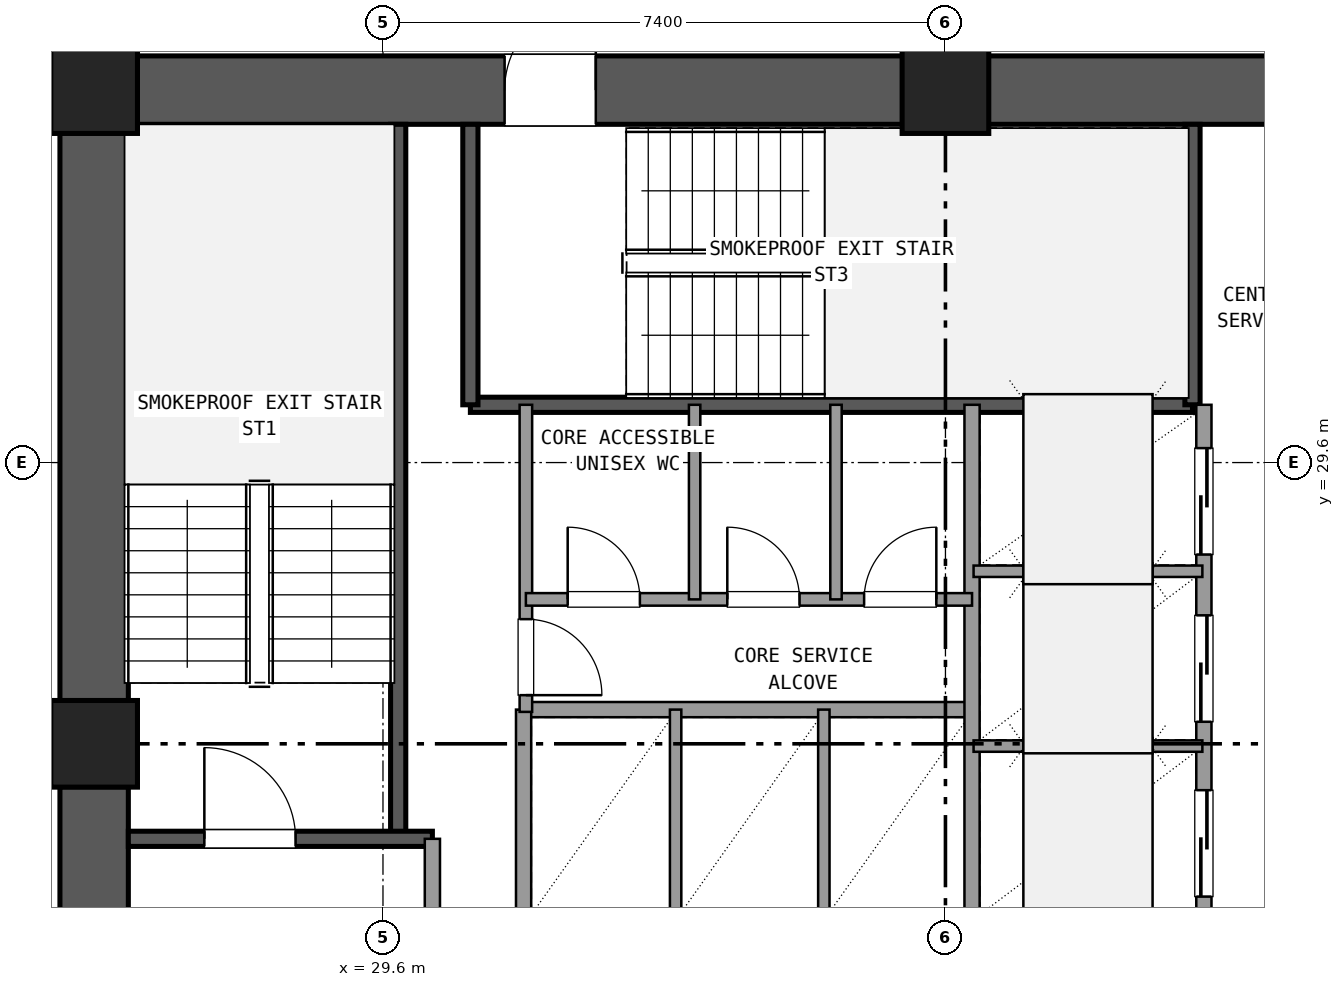
"""IFC4 building model, lengths in metres.
Left out: names, types, materials, properties, quantities, classifications, styles, units other than length and angle.
Written with IfcOpenShell. Run it as: python <this file> out.ifc"""

import sys

from ifc_helpers import new_model, si_unit, direction, frame, frame_2d, origin, origin_2d, place, context, subcontext, project, spatial, rectangle, extrude, element, fill, save


model = new_model("IFC4")
c1 = context("Model", 3, precision=1e-05, world=origin(), true_north=direction((0.0, 1.0)))
c2 = subcontext(c1, "Body", "Model", "MODEL_VIEW")
j1 = project(units=[si_unit("LENGTHUNIT", "METRE"), si_unit("PLANEANGLEUNIT", "RADIAN")], contexts=[c1])
p1 = place(None, origin())
s1 = spatial("IfcSite", under=j1, at=p1, CompositionType="ELEMENT")
p2 = place(p1, origin())
s2 = spatial("IfcBuilding", under=s1, at=p2, CompositionType="ELEMENT")
p3 = place(p2, frame((0.0, 0.0, 23.94)))
s3 = spatial("IfcBuildingStorey", under=s2, at=p3, CompositionType="ELEMENT", Elevation=23.94)
for number, where, z_axis, x_axis in (
    (1, (37.0, 34.5, 0.0), (0.0, 0.0, 1.0), (1.0, 0.0, 0.0)),
    (2, (25.8, 34.5, 0.0), (0.0, 0.0, 1.0), (1.0, 0.0, 0.0)),
    (3, (25.8, 25.9, 0.0), (0.0, 0.0, 1.0), (1.0, 0.0, 0.0)),
):
    element("IfcColumn", number, at=place(p3, frame(where, z_axis=z_axis, x_axis=x_axis)), inside=s3, PredefinedType="COLUMN", context=c2, shape_type="SweptSolid", body=[
        extrude(rectangle(XDim=1.14, YDim=1.14, at=origin_2d()), origin(), (0.0, 0.0, 1.0), 3.6),
    ])
p4 = place(p3, frame((47.635, 34.5, 0.0), z_axis=(0.0, 0.0, 1.0), x_axis=(-1.0, 0.0, 0.0)))
e4 = element("IfcWall", 4, at=p4, inside=s3, PredefinedType="SHEAR", context=c2, shape_type="SweptSolid", body=[
    extrude(rectangle(XDim=10.07, YDim=0.9, at=frame_2d((5.035, 0.0))), origin(), (0.0, 0.0, 1.0), 3.32),
])
p5 = place(p4, frame((4.535, 0.0, 0.0)))
e5 = element("IfcOpeningElement", 5, at=p5, cuts=e4, PredefinedType="OPENING", context=c2, shape_type="SweptSolid", body=[
    extrude(rectangle(XDim=1.6, YDim=2.2, at=frame_2d((0.8, 1.1))), frame((0.0, 0.46, 0.0), z_axis=(0.0, -1.0, 0.0), x_axis=(1.0, 0.0, 0.0)), (0.0, 0.0, 1.0), 0.92),
])
p6 = place(p3, frame((36.435, 34.5, 0.0), z_axis=(0.0, 0.0, 1.0), x_axis=(-1.0, 0.0, 0.0)))
e6 = element("IfcWall", 6, at=p6, inside=s3, PredefinedType="SHEAR", context=c2, shape_type="SweptSolid", body=[
    extrude(rectangle(XDim=10.07, YDim=0.9, at=frame_2d((5.035, 0.0))), origin(), (0.0, 0.0, 1.0), 3.32),
])
p7 = place(p6, frame((4.035, 0.0, 0.0)))
e7 = element("IfcOpeningElement", 7, at=p7, cuts=e6, PredefinedType="OPENING", context=c2, shape_type="SweptSolid", body=[
    extrude(rectangle(XDim=1.2, YDim=2.15, at=frame_2d((0.6, 1.075))), frame((0.0, 0.46, 0.0), z_axis=(0.0, -1.0, 0.0), x_axis=(1.0, 0.0, 0.0)), (0.0, 0.0, 1.0), 0.92),
])
p8 = place(p3, frame((25.8, 33.935, 0.0), z_axis=(0.0, 0.0, 1.0), x_axis=(0.0, -1.0, 0.0)))
e8 = element("IfcWall", 8, at=p8, inside=s3, PredefinedType="SHEAR", context=c2, shape_type="SweptSolid", body=[
    extrude(rectangle(XDim=7.47, YDim=0.9, at=frame_2d((3.735, 0.0))), origin(), (0.0, 0.0, 1.0), 3.32),
])
p9 = place(p3, frame((25.8, 25.335, 0.0), z_axis=(0.0, 0.0, 1.0), x_axis=(0.0, -1.0, 0.0)))
e9 = element("IfcWall", 9, at=p9, inside=s3, PredefinedType="SHEAR", context=c2, shape_type="SweptSolid", body=[
    extrude(rectangle(XDim=7.47, YDim=0.9, at=frame_2d((3.735, 0.0))), origin(), (0.0, 0.0, 1.0), 3.32),
])
p10 = place(p9, frame((2.085, 0.0, 0.0)))
e10 = element("IfcOpeningElement", 10, at=p10, cuts=e9, PredefinedType="OPENING", context=c2, shape_type="SweptSolid", body=[
    extrude(rectangle(XDim=1.2, YDim=2.15, at=frame_2d((0.6, 1.075))), frame((0.0, 0.46, 0.0), z_axis=(0.0, -1.0, 0.0), x_axis=(1.0, 0.0, 0.0)), (0.0, 0.0, 1.0), 0.92),
])
p11 = place(p3, frame((29.8, 24.65, 0.0), z_axis=(0.0, 0.0, 1.0), x_axis=(0.0, 1.0, 0.0)))
e11 = element("IfcWall", 11, at=p11, inside=s3, PredefinedType="SHEAR", context=c2, shape_type="SweptSolid", body=[
    extrude(rectangle(XDim=9.4, YDim=0.2, at=frame_2d((4.7, 0.0))), origin(), (0.0, 0.0, 1.0), 3.32),
])
p12 = place(p3, frame((26.25, 24.65, 0.0), z_axis=(0.0, 0.0, 1.0), x_axis=(1.0, 0.0, 0.0)))
e12 = element("IfcWall", 12, at=p12, inside=s3, PredefinedType="SHEAR", context=c2, shape_type="SweptSolid", body=[
    extrude(rectangle(XDim=4.0, YDim=0.2, at=frame_2d((2.0, 0.0))), origin(), (0.0, 0.0, 1.0), 3.32),
])
p13 = place(p12, frame((1.0, 0.0, 0.0)))
e13 = element("IfcOpeningElement", 13, at=p13, cuts=e12, PredefinedType="OPENING", context=c2, shape_type="SweptSolid", body=[
    extrude(rectangle(XDim=1.2, YDim=2.15, at=frame_2d((0.6, 1.075))), frame((0.0, 0.11, 0.0), z_axis=(0.0, -1.0, 0.0), x_axis=(1.0, 0.0, 0.0)), (0.0, 0.0, 1.0), 0.22),
])
p14 = place(p3, frame((30.75, 30.36, 0.0), z_axis=(0.0, 0.0, 1.0), x_axis=(1.0, 0.0, 0.0)))
e14 = element("IfcWall", 14, at=p14, inside=s3, PredefinedType="SHEAR", context=c2, shape_type="SweptSolid", body=[
    extrude(rectangle(XDim=9.5, YDim=0.2, at=frame_2d((4.75, 0.0))), origin(), (0.0, 0.0, 1.0), 3.32),
])
for number, where, z_axis, x_axis in (
    (15, (30.75, 30.36, 0.0), (0.0, 0.0, 1.0), (0.0, 1.0, 0.0)),
    (16, (40.25, 30.36, 0.0), (0.0, 0.0, 1.0), (0.0, 1.0, 0.0)),
):
    element("IfcWall", number, at=place(p3, frame(where, z_axis=z_axis, x_axis=x_axis)), inside=s3, PredefinedType="SHEAR", context=c2, shape_type="SweptSolid", body=[
        extrude(rectangle(XDim=3.69, YDim=0.2, at=frame_2d((1.845, 0.0))), origin(), (0.0, 0.0, 1.0), 3.32),
    ])
p15 = place(p3, frame((30.25, 17.75, 0.0), z_axis=(0.0, 0.0, 1.0), x_axis=(0.0, 1.0, 0.0)))
e17 = element("IfcWall", 17, at=p15, inside=s3, PredefinedType="SOLIDWALL", context=c2, shape_type="SweptSolid", body=[
    extrude(rectangle(XDim=6.9, YDim=0.2, at=frame_2d((3.45, 0.0))), origin(), (0.0, 0.0, 1.0), 2.61),
])
p16 = place(p15, frame((4.15, 0.0, 0.0)))
e18 = element("IfcOpeningElement", 18, at=p16, cuts=e17, PredefinedType="OPENING", context=c2, shape_type="SweptSolid", body=[
    extrude(rectangle(XDim=1.2, YDim=2.15, at=frame_2d((0.6, 1.075))), frame((0.0, 0.11, 0.0), z_axis=(0.0, -1.0, 0.0), x_axis=(1.0, 0.0, 0.0)), (0.0, 0.0, 1.0), 0.22),
])
p17 = place(p3, frame((31.45, 26.35, 0.0), z_axis=(0.0, 0.0, 1.0), x_axis=(1.0, 0.0, 0.0)))
e19 = element("IfcWall", 19, at=p17, inside=s3, PredefinedType="SOLIDWALL", context=c2, shape_type="SweptSolid", body=[
    extrude(rectangle(XDim=5.9, YDim=0.2, at=frame_2d((2.95, 0.0))), origin(), (0.0, 0.0, 1.0), 2.61),
])
p18 = place(p3, frame((31.45, 23.54, 0.0), z_axis=(0.0, 0.0, 1.0), x_axis=(0.0, 1.0, 0.0)))
e20 = element("IfcWall", 20, at=p18, inside=s3, PredefinedType="SOLIDWALL", context=c2, shape_type="SweptSolid", body=[
    extrude(rectangle(XDim=2.81, YDim=0.2, at=frame_2d((1.405, 0.0))), origin(), (0.0, 0.0, 1.0), 2.61),
])
for number, where, z_axis, x_axis in (
    (21, (33.45, 23.54, 0.0), (0.0, 0.0, 1.0), (0.0, 1.0, 0.0)),
    (22, (35.4, 23.54, 0.0), (0.0, 0.0, 1.0), (0.0, 1.0, 0.0)),
):
    element("IfcWall", number, at=place(p3, frame(where, z_axis=z_axis, x_axis=x_axis)), inside=s3, PredefinedType="PARTITIONING", context=c2, shape_type="SweptSolid", body=[
        extrude(rectangle(XDim=2.81, YDim=0.15, at=frame_2d((1.405, 0.0))), origin(), (0.0, 0.0, 1.0), 2.61),
    ])
p19 = place(p3, frame((37.35, 23.54, 0.0), z_axis=(0.0, 0.0, 1.0), x_axis=(0.0, 1.0, 0.0)))
e23 = element("IfcWall", 23, at=p19, inside=s3, PredefinedType="SOLIDWALL", context=c2, shape_type="SweptSolid", body=[
    extrude(rectangle(XDim=6.82, YDim=0.2, at=frame_2d((3.41, 0.0))), origin(), (0.0, 0.0, 1.0), 2.61),
])
p20 = place(p3, frame((40.4, 23.54, 0.0), z_axis=(0.0, 0.0, 1.0), x_axis=(0.0, 1.0, 0.0)))
e24 = element("IfcWall", 24, at=p20, inside=s3, PredefinedType="SOLIDWALL", context=c2, shape_type="SweptSolid", body=[
    extrude(rectangle(XDim=6.82, YDim=0.2, at=frame_2d((3.41, 0.0))), origin(), (0.0, 0.0, 1.0), 2.61),
])
p21 = place(p20, frame((0.35, 0.0, 0.0)))
e25 = element("IfcOpeningElement", 25, at=p21, cuts=e24, PredefinedType="OPENING", context=c2, shape_type="SweptSolid", body=[
    extrude(rectangle(XDim=1.4, YDim=2.2, at=frame_2d((0.7, 1.1))), frame((0.0, 0.11, 0.0), z_axis=(0.0, -1.0, 0.0), x_axis=(1.0, 0.0, 0.0)), (0.0, 0.0, 1.0), 0.22),
])
p22 = place(p20, frame((2.65, 0.0, 0.0)))
e26 = element("IfcOpeningElement", 26, at=p22, cuts=e24, PredefinedType="OPENING", context=c2, shape_type="SweptSolid", body=[
    extrude(rectangle(XDim=1.4, YDim=2.2, at=frame_2d((0.7, 1.1))), frame((0.0, 0.11, 0.0), z_axis=(0.0, -1.0, 0.0), x_axis=(1.0, 0.0, 0.0)), (0.0, 0.0, 1.0), 0.22),
])
p23 = place(p20, frame((4.85, 0.0, 0.0)))
e27 = element("IfcOpeningElement", 27, at=p23, cuts=e24, PredefinedType="OPENING", context=c2, shape_type="SweptSolid", body=[
    extrude(rectangle(XDim=1.4, YDim=2.2, at=frame_2d((0.7, 1.1))), frame((0.0, 0.11, 0.0), z_axis=(0.0, -1.0, 0.0), x_axis=(1.0, 0.0, 0.0)), (0.0, 0.0, 1.0), 0.22),
])
for number, where, z_axis, x_axis in (
    (28, (37.37, 25.87, 0.0), (0.0, 0.0, 1.0), (1.0, 0.0, 0.0)),
    (29, (37.37, 28.17, 0.0), (0.0, 0.0, 1.0), (1.0, 0.0, 0.0)),
):
    element("IfcWall", number, at=place(p3, frame(where, z_axis=z_axis, x_axis=x_axis)), inside=s3, PredefinedType="PARTITIONING", context=c2, shape_type="SweptSolid", body=[
        extrude(rectangle(XDim=3.01, YDim=0.15, at=frame_2d((1.505, 0.0))), origin(), (0.0, 0.0, 1.0), 2.61),
    ])
p24 = place(p3, frame((31.48, 26.32, 0.0), z_axis=(0.0, 0.0, 1.0), x_axis=(0.0, 1.0, 0.0)))
e30 = element("IfcWall", 30, at=p24, inside=s3, PredefinedType="PLUMBINGWALL", context=c2, shape_type="SweptSolid", body=[
    extrude(rectangle(XDim=4.04, YDim=0.165, at=frame_2d((2.02, 0.0))), origin(), (0.0, 0.0, 1.0), 2.61),
])
p25 = place(p24, frame((0.22, 0.0, 0.0)))
e31 = element("IfcOpeningElement", 31, at=p25, cuts=e30, PredefinedType="OPENING", context=c2, shape_type="SweptSolid", body=[
    extrude(rectangle(XDim=1.0, YDim=2.15, at=frame_2d((0.5, 1.075))), frame((0.0, 0.093, 0.0), z_axis=(0.0, -1.0, 0.0), x_axis=(1.0, 0.0, 0.0)), (0.0, 0.0, 1.0), 0.185),
])
p26 = place(p3, frame((31.48, 27.8, 0.0), z_axis=(0.0, 0.0, 1.0), x_axis=(1.0, 0.0, 0.0)))
e32 = element("IfcWall", 32, at=p26, inside=s3, PredefinedType="PLUMBINGWALL", context=c2, shape_type="SweptSolid", body=[
    extrude(rectangle(XDim=5.87, YDim=0.165, at=frame_2d((2.935, 0.0))), origin(), (0.0, 0.0, 1.0), 2.61),
])
p27 = place(p26, frame((0.55, 0.0, 0.0)))
e33 = element("IfcOpeningElement", 33, at=p27, cuts=e32, PredefinedType="OPENING", context=c2, shape_type="SweptSolid", body=[
    extrude(rectangle(XDim=0.95, YDim=2.1, at=frame_2d((0.475, 1.05))), frame((0.0, 0.093, 0.0), z_axis=(0.0, -1.0, 0.0), x_axis=(1.0, 0.0, 0.0)), (0.0, 0.0, 1.0), 0.185),
])
p28 = place(p26, frame((2.65, 0.0, 0.0)))
e34 = element("IfcOpeningElement", 34, at=p28, cuts=e32, PredefinedType="OPENING", context=c2, shape_type="SweptSolid", body=[
    extrude(rectangle(XDim=0.95, YDim=2.1, at=frame_2d((0.475, 1.05))), frame((0.0, 0.093, 0.0), z_axis=(0.0, -1.0, 0.0), x_axis=(1.0, 0.0, 0.0)), (0.0, 0.0, 1.0), 0.185),
])
p29 = place(p26, frame((4.45, 0.0, 0.0)))
e35 = element("IfcOpeningElement", 35, at=p29, cuts=e32, PredefinedType="OPENING", context=c2, shape_type="SweptSolid", body=[
    extrude(rectangle(XDim=0.95, YDim=2.1, at=frame_2d((0.475, 1.05))), frame((0.0, 0.093, 0.0), z_axis=(0.0, -1.0, 0.0), x_axis=(1.0, 0.0, 0.0)), (0.0, 0.0, 1.0), 0.185),
])
for number, where, z_axis, x_axis in (
    (36, (33.7, 27.8, 0.0), (0.0, 0.0, 1.0), (0.0, 1.0, 0.0)),
    (37, (35.56, 27.8, 0.0), (0.0, 0.0, 1.0), (0.0, 1.0, 0.0)),
):
    element("IfcWall", number, at=place(p3, frame(where, z_axis=z_axis, x_axis=x_axis)), inside=s3, PredefinedType="PARTITIONING", context=c2, shape_type="SweptSolid", body=[
        extrude(rectangle(XDim=2.56, YDim=0.15, at=frame_2d((1.28, 0.0))), origin(), (0.0, 0.0, 1.0), 2.61),
    ])
p30 = place(p3, frame((37.0, 34.95, 0.0), z_axis=(0.0, 0.0, 1.0), x_axis=(0.0, 1.0, 0.0)))
e38 = element("IfcWall", 38, at=p30, inside=s3, PredefinedType="PARTITIONING", context=c2, shape_type="SweptSolid", body=[
    extrude(rectangle(XDim=2.7, YDim=0.18, at=frame_2d((1.35, 0.0))), origin(), (0.0, 0.0, 1.0), 2.61),
])
p31 = place(p30, frame((0.35, 0.0, 0.0)))
e39 = element("IfcOpeningElement", 39, at=p31, cuts=e38, PredefinedType="OPENING", context=c2, shape_type="SweptSolid", body=[
    extrude(rectangle(XDim=2.0, YDim=2.2, at=frame_2d((1.0, 1.1))), frame((0.0, 0.1, 0.0), z_axis=(0.0, -1.0, 0.0), x_axis=(1.0, 0.0, 0.0)), (0.0, 0.0, 1.0), 0.2),
])
p32 = place(p13, origin())
e40 = element("IfcDoor", 40, at=p32, inside=s3, OperationType="SINGLE_SWING_LEFT", PredefinedType="DOOR", context=c2, shape_type="SweptSolid", body=[
    extrude(rectangle(XDim=1.2, YDim=2.15, at=frame_2d((0.6, 1.075))), frame((0.0, 0.025, 0.0), z_axis=(0.0, -1.0, 0.0), x_axis=(1.0, 0.0, 0.0)), (0.0, 0.0, 1.0), 0.05),
])
fill(e13, e40)
p33 = place(p7, frame((1.2, 0.0, 0.0), z_axis=(0.0, 0.0, 1.0), x_axis=(-1.0, 0.0, 0.0)))
e41 = element("IfcDoor", 41, at=p33, inside=s3, OperationType="SINGLE_SWING_LEFT", PredefinedType="DOOR", context=c2, shape_type="SweptSolid", body=[
    extrude(rectangle(XDim=1.2, YDim=2.15, at=frame_2d((0.6, 1.075))), frame((0.0, 0.025, 0.0), z_axis=(0.0, -1.0, 0.0), x_axis=(1.0, 0.0, 0.0)), (0.0, 0.0, 1.0), 0.05),
])
fill(e7, e41)
p34 = place(p21, origin())
e42 = element("IfcDoor", 42, at=p34, inside=s3, OperationType="SLIDING_TO_LEFT", PredefinedType="DOOR", context=c2, shape_type="SweptSolid", body=[
    extrude(rectangle(XDim=1.4, YDim=2.2, at=frame_2d((0.7, 1.1))), frame((0.0, 0.025, 0.0), z_axis=(0.0, -1.0, 0.0), x_axis=(1.0, 0.0, 0.0)), (0.0, 0.0, 1.0), 0.05),
])
fill(e25, e42)
p35 = place(p22, origin())
e43 = element("IfcDoor", 43, at=p35, inside=s3, OperationType="SLIDING_TO_LEFT", PredefinedType="DOOR", context=c2, shape_type="SweptSolid", body=[
    extrude(rectangle(XDim=1.4, YDim=2.2, at=frame_2d((0.7, 1.1))), frame((0.0, 0.025, 0.0), z_axis=(0.0, -1.0, 0.0), x_axis=(1.0, 0.0, 0.0)), (0.0, 0.0, 1.0), 0.05),
])
fill(e26, e43)
p36 = place(p23, origin())
e44 = element("IfcDoor", 44, at=p36, inside=s3, OperationType="SLIDING_TO_RIGHT", PredefinedType="DOOR", context=c2, shape_type="SweptSolid", body=[
    extrude(rectangle(XDim=1.4, YDim=2.2, at=frame_2d((0.7, 1.1))), frame((0.0, 0.025, 0.0), z_axis=(0.0, -1.0, 0.0), x_axis=(1.0, 0.0, 0.0)), (0.0, 0.0, 1.0), 0.05),
])
fill(e27, e44)
p37 = place(p25, frame((1.0, 0.0, 0.0), z_axis=(0.0, 0.0, 1.0), x_axis=(-1.0, 0.0, 0.0)))
e45 = element("IfcDoor", 45, at=p37, inside=s3, OperationType="SINGLE_SWING_LEFT", PredefinedType="DOOR", context=c2, shape_type="SweptSolid", body=[
    extrude(rectangle(XDim=1.0, YDim=2.15, at=frame_2d((0.5, 1.075))), frame((0.0, 0.025, 0.0), z_axis=(0.0, -1.0, 0.0), x_axis=(1.0, 0.0, 0.0)), (0.0, 0.0, 1.0), 0.05),
])
fill(e31, e45)
p38 = place(p27, origin())
e46 = element("IfcDoor", 46, at=p38, inside=s3, OperationType="SINGLE_SWING_LEFT", PredefinedType="DOOR", context=c2, shape_type="SweptSolid", body=[
    extrude(rectangle(XDim=0.95, YDim=2.1, at=frame_2d((0.475, 1.05))), frame((0.0, 0.025, 0.0), z_axis=(0.0, -1.0, 0.0), x_axis=(1.0, 0.0, 0.0)), (0.0, 0.0, 1.0), 0.05),
])
fill(e33, e46)
p39 = place(p28, origin())
e47 = element("IfcDoor", 47, at=p39, inside=s3, OperationType="SINGLE_SWING_LEFT", PredefinedType="DOOR", context=c2, shape_type="SweptSolid", body=[
    extrude(rectangle(XDim=0.95, YDim=2.1, at=frame_2d((0.475, 1.05))), frame((0.0, 0.025, 0.0), z_axis=(0.0, -1.0, 0.0), x_axis=(1.0, 0.0, 0.0)), (0.0, 0.0, 1.0), 0.05),
])
fill(e34, e47)
p40 = place(p29, origin())
e48 = element("IfcDoor", 48, at=p40, inside=s3, OperationType="SINGLE_SWING_RIGHT", PredefinedType="DOOR", context=c2, shape_type="SweptSolid", body=[
    extrude(rectangle(XDim=0.95, YDim=2.1, at=frame_2d((0.475, 1.05))), frame((0.0, 0.025, 0.0), z_axis=(0.0, -1.0, 0.0), x_axis=(1.0, 0.0, 0.0)), (0.0, 0.0, 1.0), 0.05),
])
fill(e35, e48)
save(model, sys.argv[1])
